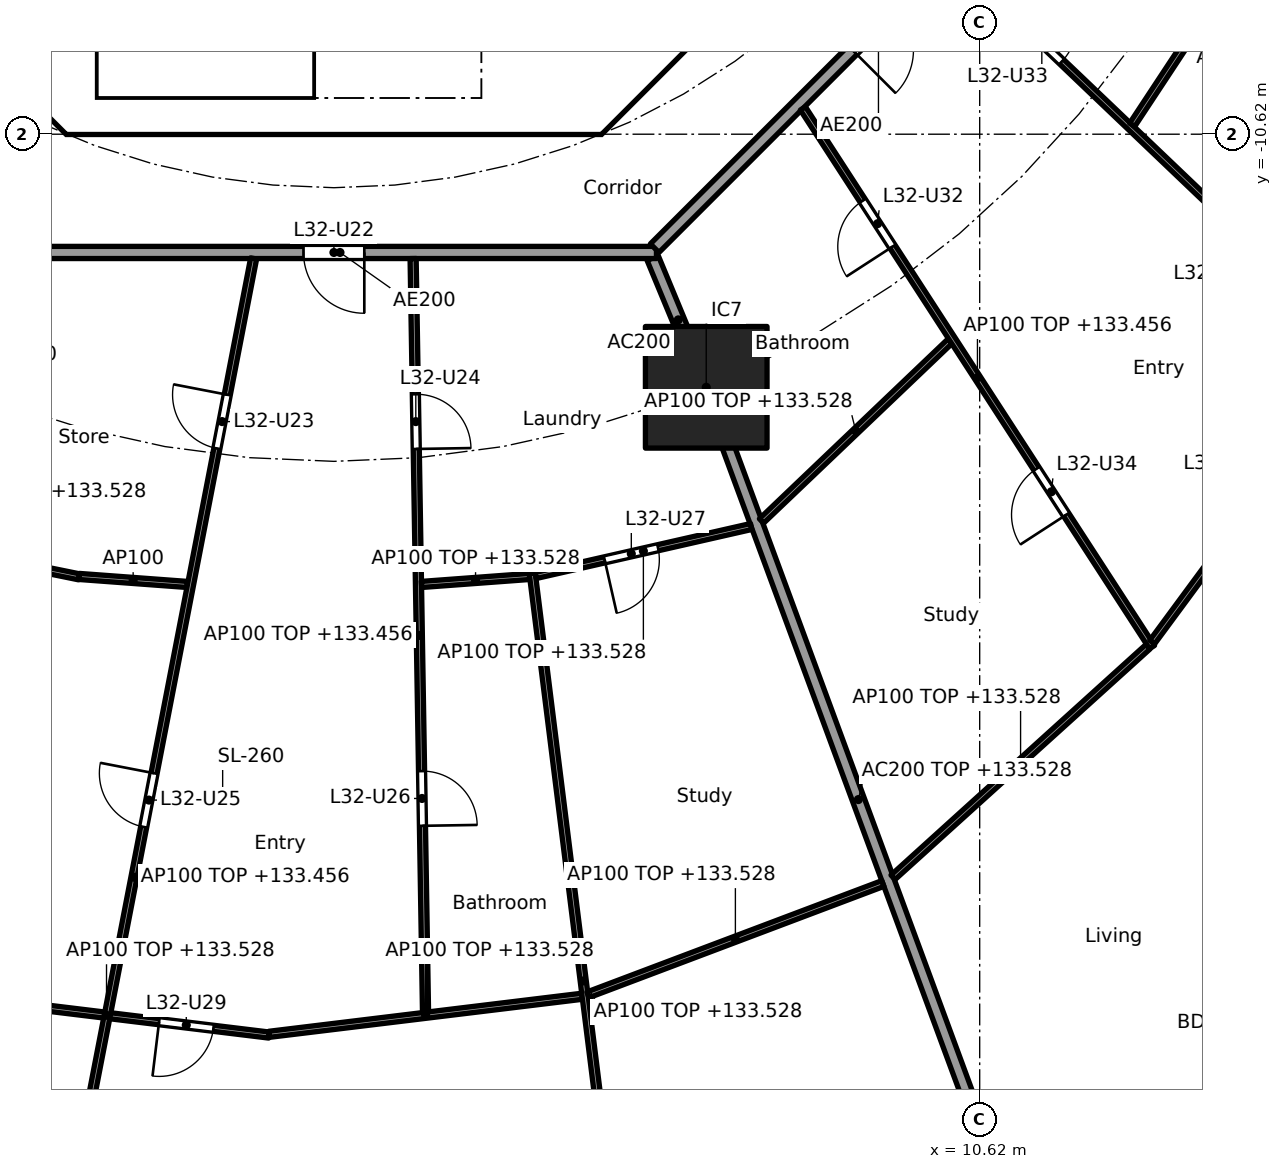
"""IFC4 building model, lengths in metres.
Left out: names, types, materials, properties, quantities, classifications, styles, units other than length and angle.
Written with IfcOpenShell. Run it as: python <this file> out.ifc"""

import sys

from ifc_helpers import new_model, si_unit, direction, frame, frame_2d, origin, origin_2d, place, context, subcontext, project, spatial, polyline, rectangle, outline, extrude, element, fill, save


model = new_model("IFC4")
c1 = context("Model", 3, precision=1e-05, world=origin(), true_north=direction((0.0, 1.0)))
c2 = subcontext(c1, "Body", "Model", "MODEL_VIEW")
j1 = project(units=[si_unit("LENGTHUNIT", "METRE"), si_unit("PLANEANGLEUNIT", "RADIAN")], contexts=[c1])
p1 = place(None, origin())
s1 = spatial("IfcSite", under=j1, at=p1, CompositionType="ELEMENT")
p2 = place(p1, origin())
s2 = spatial("IfcBuilding", under=s1, at=p2, CompositionType="ELEMENT")
p3 = place(p2, frame((0.0, 0.0, 130.7)))
s3 = spatial("IfcBuildingStorey", under=s2, at=p3, CompositionType="ELEMENT", Elevation=130.7)
p4 = place(p3, frame((6.123, -14.782, 0.0), z_axis=(0.0, 0.0, 1.0), x_axis=(1.0, 0.0, 0.0)))
e1 = element("IfcColumn", 1, at=p4, inside=s3, PredefinedType="COLUMN", context=c2, shape_type="SweptSolid", body=[
    extrude(rectangle(XDim=2.0, YDim=2.0, at=origin_2d()), origin(), (0.0, 0.0, 1.0), 3.7),
])
p5 = place(p3, frame((16.45, -24.804, 0.0), z_axis=(0.0, 0.0, 1.0), x_axis=(-0.707857739375, -0.706355024621, 0.0)))
e2 = element("IfcWall", 2, at=p5, inside=s3, PredefinedType="SOLIDWALL", context=c2, shape_type="SweptSolid", body=[
    extrude(rectangle(XDim=3.087, YDim=0.25, at=frame_2d((1.543, 0.0))), origin(), (0.0, 0.0, 1.0), 3.44),
])
p6 = place(p5, frame((0.493, 0.0, 0.0)))
e3 = element("IfcOpeningElement", 3, at=p6, cuts=e2, PredefinedType="OPENING", context=c2, shape_type="SweptSolid", body=[
    extrude(rectangle(XDim=2.1, YDim=2.4, at=frame_2d((1.05, 1.2))), frame((0.0, 0.135, 0.0), z_axis=(0.0, -1.0, 0.0), x_axis=(1.0, 0.0, 0.0)), (0.0, 0.0, 1.0), 0.27),
])
p7 = place(p3, frame((-9.988, -4.613, 0.0), z_axis=(0.0, 0.0, 1.0), x_axis=(0.707106781187, -0.707106781187, 0.0)))
e4 = element("IfcWall", 4, at=p7, inside=s3, PredefinedType="SHEAR", context=c2, shape_type="SweptSolid", body=[
    extrude(rectangle(XDim=7.602, YDim=0.6, at=frame_2d((3.801, 0.0))), origin(), (0.0, 0.0, 1.0), 3.44),
])
p8 = place(p7, frame((6.151, 0.0, 0.0)))
e5 = element("IfcOpeningElement", 5, at=p8, cuts=e4, PredefinedType="OPENING", context=c2, shape_type="SweptSolid", body=[
    extrude(rectangle(XDim=1.1, YDim=2.1, at=frame_2d((0.55, 1.05))), frame((0.0, 0.31, 0.0), z_axis=(0.0, -1.0, 0.0), x_axis=(1.0, 0.0, 0.0)), (0.0, 0.0, 1.0), 0.62),
])
p9 = place(p3, frame((4.613, -9.988, 0.0), z_axis=(0.0, 0.0, 1.0), x_axis=(0.707106781187, 0.707106781187, 0.0)))
e6 = element("IfcWall", 6, at=p9, inside=s3, PredefinedType="SHEAR", context=c2, shape_type="SweptSolid", body=[
    extrude(rectangle(XDim=7.602, YDim=0.6, at=frame_2d((3.801, 0.0))), origin(), (0.0, 0.0, 1.0), 3.44),
])
p10 = place(p9, frame((3.201, 0.0, 0.0)))
e7 = element("IfcOpeningElement", 7, at=p10, cuts=e6, PredefinedType="OPENING", context=c2, shape_type="SweptSolid", body=[
    extrude(rectangle(XDim=1.2, YDim=2.1, at=frame_2d((0.6, 1.05))), frame((0.0, 0.31, 0.0), z_axis=(0.0, -1.0, 0.0), x_axis=(1.0, 0.0, 0.0)), (0.0, 0.0, 1.0), 0.62),
])
p11 = place(p3, frame((4.0, -10.025, 0.0), z_axis=(0.0, 0.0, 1.0), x_axis=(0.0, 1.0, 0.0)))
e8 = element("IfcWall", 8, at=p11, inside=s3, PredefinedType="SOLIDWALL", context=c2, shape_type="SweptSolid", body=[
    extrude(rectangle(XDim=3.0, YDim=0.2, at=frame_2d((1.5, 0.0))), origin(), (0.0, 0.0, 1.0), 3.44),
])
p12 = place(p11, frame((0.975, 0.0, 0.0)))
e9 = element("IfcOpeningElement", 9, at=p12, cuts=e8, PredefinedType="OPENING", context=c2, shape_type="SweptSolid", body=[
    extrude(rectangle(XDim=1.1, YDim=2.1, at=frame_2d((0.55, 1.05))), frame((0.0, 0.11, 0.0), z_axis=(0.0, -1.0, 0.0), x_axis=(1.0, 0.0, 0.0)), (0.0, 0.0, 1.0), 0.22),
])
p13 = place(p3, origin())
e10 = element("IfcWall", 10, at=p13, inside=s3, PredefinedType="SHEAR", context=c2, shape_type="SweptSolid", body=[
    extrude(outline(polyline([(-4.152, -10.025), (4.152, -10.025), (4.401, -9.776), (4.825, -10.2), (4.401, -10.625), (-4.401, -10.625), (-4.825, -10.2), (-4.401, -9.776), (-4.152, -10.025)])), origin(), (0.0, 0.0, 1.0), 3.44),
])
p14 = place(p3, origin())
e11 = element("IfcWall", 11, at=p14, inside=s3, PredefinedType="SOLIDWALL", context=c2, shape_type="SweptSolid", body=[
    extrude(outline(polyline([(-3.9, -10.025), (-4.1, -10.025), (-4.1, -7.025), (-3.9, -7.025), (-3.9, -10.025)])), origin(), (0.0, 0.0, 1.0), 3.44),
])
p15 = place(p3, frame((5.243, -12.657, 0.0), z_axis=(0.0, 0.0, 1.0), x_axis=(0.38273085373, -0.923859888513, 0.0)))
e12 = element("IfcWall", 12, at=p15, inside=s3, PredefinedType="PARTITIONING", context=c2, shape_type="SweptSolid", body=[
    extrude(rectangle(XDim=2.199, YDim=0.2, at=frame_2d((1.1, 0.0))), origin(), (0.0, 0.0, 1.0), 3.44),
])
p16 = place(p3, frame((6.14, -14.829, 0.0), z_axis=(0.0, 0.0, 1.0), x_axis=(0.346169582481, -0.938171956608, 0.0)))
e13 = element("IfcWall", 13, at=p16, inside=s3, PredefinedType="PARTITIONING", context=c2, shape_type="SweptSolid", body=[
    extrude(rectangle(XDim=14.354, YDim=0.2, at=frame_2d((7.177, 0.0))), origin(), (0.0, 0.0, 1.0), 2.828),
])
p17 = place(p3, frame((-5.104, -12.565, 0.0), z_axis=(0.0, 0.0, 1.0), x_axis=(1.0, 0.0, 0.0)))
e14 = element("IfcWall", 14, at=p17, inside=s3, PredefinedType="PARTITIONING", context=c2, shape_type="SweptSolid", body=[
    extrude(rectangle(XDim=10.409, YDim=0.2, at=frame_2d((5.205, 0.0))), origin(), (0.0, 0.0, 1.0), 3.44),
])
p18 = place(p17, frame((4.604, 0.0, 0.0)))
e15 = element("IfcOpeningElement", 15, at=p18, cuts=e14, PredefinedType="OPENING", context=c2, shape_type="SweptSolid", body=[
    extrude(rectangle(XDim=1.0, YDim=2.1, at=frame_2d((0.5, 1.05))), frame((0.0, 0.11, 0.0), z_axis=(0.0, -1.0, 0.0), x_axis=(1.0, 0.0, 0.0)), (0.0, 0.0, 1.0), 0.22),
])
p19 = place(p3, frame((5.275, -12.494, 0.0), z_axis=(0.0, 0.0, 1.0), x_axis=(0.707106781187, 0.707106781187, 0.0)))
e16 = element("IfcWall", 16, at=p19, inside=s3, PredefinedType="PARTITIONING", context=c2, shape_type="SweptSolid", body=[
    extrude(rectangle(XDim=10.409, YDim=0.2, at=frame_2d((5.205, 0.0))), origin(), (0.0, 0.0, 1.0), 3.44),
])
p20 = place(p19, frame((4.604, 0.0, 0.0)))
e17 = element("IfcOpeningElement", 17, at=p20, cuts=e16, PredefinedType="OPENING", context=c2, shape_type="SweptSolid", body=[
    extrude(rectangle(XDim=1.0, YDim=2.1, at=frame_2d((0.5, 1.05))), frame((0.0, 0.11, 0.0), z_axis=(0.0, -1.0, 0.0), x_axis=(1.0, 0.0, 0.0)), (0.0, 0.0, 1.0), 0.22),
])
p21 = place(p3, frame((-7.52, -17.222, 0.0), z_axis=(0.0, 0.0, 1.0), x_axis=(0.979964966792, -0.199169937141, 0.0)))
e18 = element("IfcWall", 18, at=p21, inside=s3, PredefinedType="PARTITIONING", context=c2, shape_type="SweptSolid", body=[
    extrude(rectangle(XDim=3.397, YDim=0.1, at=frame_2d((1.698, 0.0))), origin(), (0.0, 0.0, 1.0), 2.828),
])
p22 = place(p3, frame((-4.19, -17.893, 0.0), z_axis=(0.0, 0.0, 1.0), x_axis=(0.99727037024, -0.07383636395, 0.0)))
e19 = element("IfcWall", 19, at=p22, inside=s3, PredefinedType="PARTITIONING", context=c2, shape_type="SweptSolid", body=[
    extrude(rectangle(XDim=1.782, YDim=0.1, at=frame_2d((0.891, 0.0))), origin(), (0.0, 0.0, 1.0), 3.44),
])
p23 = place(p3, frame((-6.413, -24.784, 0.0), z_axis=(0.0, 0.0, 1.0), x_axis=(0.99268660964, -0.120719903255, 0.0)))
e20 = element("IfcWall", 20, at=p23, inside=s3, PredefinedType="PARTITIONING", context=c2, shape_type="SweptSolid", body=[
    extrude(rectangle(XDim=5.385, YDim=0.1, at=frame_2d((2.693, 0.0))), origin(), (0.0, 0.0, 1.0), 2.828),
])
p24 = place(p23, frame((3.564, 0.0, 0.0)))
e21 = element("IfcOpeningElement", 21, at=p24, cuts=e20, PredefinedType="OPENING", context=c2, shape_type="SweptSolid", body=[
    extrude(rectangle(XDim=0.9, YDim=2.1, at=frame_2d((0.45, 1.05))), frame((0.0, 0.06, 0.0), z_axis=(0.0, -1.0, 0.0), x_axis=(1.0, 0.0, 0.0)), (0.0, 0.0, 1.0), 0.12),
])
p25 = place(p3, frame((-1.32, -12.663, 0.0), z_axis=(0.0, 0.0, 1.0), x_axis=(-0.189865535907, -0.98181010296, 0.0)))
e22 = element("IfcWall", 22, at=p25, inside=s3, PredefinedType="PARTITIONING", context=c2, shape_type="SweptSolid", body=[
    extrude(rectangle(XDim=20.729, YDim=0.1, at=frame_2d((10.365, 0.0))), origin(), (0.0, 0.0, 1.0), 2.756),
])
p26 = place(p25, frame((2.283, 0.0, 0.0)))
e23 = element("IfcOpeningElement", 23, at=p26, cuts=e22, PredefinedType="OPENING", context=c2, shape_type="SweptSolid", body=[
    extrude(rectangle(XDim=0.9, YDim=2.1, at=frame_2d((0.45, 1.05))), frame((0.0, 0.06, 0.0), z_axis=(0.0, -1.0, 0.0), x_axis=(1.0, 0.0, 0.0)), (0.0, 0.0, 1.0), 0.12),
])
p27 = place(p25, frame((8.622, 0.0, 0.0)))
e24 = element("IfcOpeningElement", 24, at=p27, cuts=e22, PredefinedType="OPENING", context=c2, shape_type="SweptSolid", body=[
    extrude(rectangle(XDim=0.9, YDim=2.1, at=frame_2d((0.45, 1.05))), frame((0.0, 0.06, 0.0), z_axis=(0.0, -1.0, 0.0), x_axis=(1.0, 0.0, 0.0)), (0.0, 0.0, 1.0), 0.12),
])
p28 = place(p3, frame((-1.066, -25.422, 0.0), z_axis=(0.0, 0.0, 1.0), x_axis=(0.992692993044, 0.120667400577, 0.0)))
e25 = element("IfcWall", 25, at=p28, inside=s3, PredefinedType="PARTITIONING", context=c2, shape_type="SweptSolid", body=[
    extrude(rectangle(XDim=5.186, YDim=0.1, at=frame_2d((2.593, 0.0))), origin(), (0.0, 0.0, 1.0), 2.828),
])
p29 = place(p3, frame((1.303, -12.665, 0.0), z_axis=(0.0, 0.0, 1.0), x_axis=(0.016444820401, -0.999864774798, 0.0)))
e26 = element("IfcWall", 26, at=p29, inside=s3, PredefinedType="PARTITIONING", context=c2, shape_type="SweptSolid", body=[
    extrude(rectangle(XDim=12.396, YDim=0.1, at=frame_2d((6.198, 0.0))), origin(), (0.0, 0.0, 1.0), 2.756),
])
p30 = place(p29, frame((2.232, 0.0, 0.0)))
e27 = element("IfcOpeningElement", 27, at=p30, cuts=e26, PredefinedType="OPENING", context=c2, shape_type="SweptSolid", body=[
    extrude(rectangle(XDim=0.9, YDim=2.1, at=frame_2d((0.45, 1.05))), frame((0.0, 0.06, 0.0), z_axis=(0.0, -1.0, 0.0), x_axis=(1.0, 0.0, 0.0)), (0.0, 0.0, 1.0), 0.12),
])
p31 = place(p29, frame((8.43, 0.0, 0.0)))
e28 = element("IfcOpeningElement", 28, at=p31, cuts=e26, PredefinedType="OPENING", context=c2, shape_type="SweptSolid", body=[
    extrude(rectangle(XDim=0.9, YDim=2.1, at=frame_2d((0.45, 1.05))), frame((0.0, 0.06, 0.0), z_axis=(0.0, -1.0, 0.0), x_axis=(1.0, 0.0, 0.0)), (0.0, 0.0, 1.0), 0.12),
])
p32 = place(p3, frame((1.441, -18.024, 0.0), z_axis=(0.0, 0.0, 1.0), x_axis=(0.997269623256, 0.073846452388, 0.0)))
e29 = element("IfcWall", 29, at=p32, inside=s3, PredefinedType="PARTITIONING", context=c2, shape_type="SweptSolid", body=[
    extrude(rectangle(XDim=1.782, YDim=0.1, at=frame_2d((0.891, 0.0))), origin(), (0.0, 0.0, 1.0), 2.828),
])
p33 = place(p3, frame((3.262, -17.839, 0.0), z_axis=(0.0, 0.0, 1.0), x_axis=(0.124074750982, -0.992272873845, 0.0)))
e30 = element("IfcWall", 30, at=p33, inside=s3, PredefinedType="PARTITIONING", context=c2, shape_type="SweptSolid", body=[
    extrude(rectangle(XDim=13.516, YDim=0.1, at=frame_2d((6.758, 0.0))), origin(), (0.0, 0.0, 1.0), 2.828),
])
p34 = place(p33, frame((9.811, 0.0, 0.0)))
e31 = element("IfcOpeningElement", 31, at=p34, cuts=e30, PredefinedType="OPENING", context=c2, shape_type="SweptSolid", body=[
    extrude(rectangle(XDim=0.9, YDim=2.1, at=frame_2d((0.45, 1.05))), frame((0.0, 0.06, 0.0), z_axis=(0.0, -1.0, 0.0), x_axis=(1.0, 0.0, 0.0)), (0.0, 0.0, 1.0), 0.12),
])
p35 = place(p3, frame((3.317, -17.878, 0.0), z_axis=(0.0, 0.0, 1.0), x_axis=(0.975095905288, 0.221783623135, 0.0)))
e32 = element("IfcWall", 32, at=p35, inside=s3, PredefinedType="PARTITIONING", context=c2, shape_type="SweptSolid", body=[
    extrude(rectangle(XDim=3.636, YDim=0.1, at=frame_2d((1.818, 0.0))), origin(), (0.0, 0.0, 1.0), 2.828),
])
p36 = place(p35, frame((1.164, 0.0, 0.0)))
e33 = element("IfcOpeningElement", 33, at=p36, cuts=e32, PredefinedType="OPENING", context=c2, shape_type="SweptSolid", body=[
    extrude(rectangle(XDim=0.9, YDim=2.1, at=frame_2d((0.45, 1.05))), frame((0.0, 0.06, 0.0), z_axis=(0.0, -1.0, 0.0), x_axis=(1.0, 0.0, 0.0)), (0.0, 0.0, 1.0), 0.12),
])
p37 = place(p3, frame((4.178, -24.773, 0.0), z_axis=(0.0, 0.0, 1.0), x_axis=(0.935583811437, 0.353104703702, 0.0)))
e34 = element("IfcWall", 34, at=p37, inside=s3, PredefinedType="PARTITIONING", context=c2, shape_type="SweptSolid", body=[
    extrude(rectangle(XDim=5.184, YDim=0.1, at=frame_2d((2.592, 0.0))), origin(), (0.0, 0.0, 1.0), 2.828),
])
p38 = place(p3, frame((7.032, -16.98, 0.0), z_axis=(0.0, 0.0, 1.0), x_axis=(0.723709759148, 0.690104473622, 0.0)))
e35 = element("IfcWall", 35, at=p38, inside=s3, PredefinedType="PARTITIONING", context=c2, shape_type="SweptSolid", body=[
    extrude(rectangle(XDim=4.286, YDim=0.1, at=frame_2d((2.143, 0.0))), origin(), (0.0, 0.0, 1.0), 2.828),
])
p39 = place(p3, frame((9.195, -22.84, 0.0), z_axis=(0.0, 0.0, 1.0), x_axis=(0.741675855479, 0.670758470241, 0.0)))
e36 = element("IfcWall", 36, at=p39, inside=s3, PredefinedType="PARTITIONING", context=c2, shape_type="SweptSolid", body=[
    extrude(rectangle(XDim=5.656, YDim=0.1, at=frame_2d((2.828, 0.0))), origin(), (0.0, 0.0, 1.0), 2.828),
])
p40 = place(p3, frame((7.712, -10.195, 0.0), z_axis=(0.0, 0.0, 1.0), x_axis=(0.543868615753, -0.839170381269, 0.0)))
e37 = element("IfcWall", 37, at=p40, inside=s3, PredefinedType="PARTITIONING", context=c2, shape_type="SweptSolid", body=[
    extrude(rectangle(XDim=10.558, YDim=0.1, at=frame_2d((5.279, 0.0))), origin(), (0.0, 0.0, 1.0), 2.756),
])
p41 = place(p40, frame((1.81, 0.0, 0.0)))
e38 = element("IfcOpeningElement", 38, at=p41, cuts=e37, PredefinedType="OPENING", context=c2, shape_type="SweptSolid", body=[
    extrude(rectangle(XDim=0.9, YDim=2.1, at=frame_2d((0.45, 1.05))), frame((0.0, 0.06, 0.0), z_axis=(0.0, -1.0, 0.0), x_axis=(1.0, 0.0, 0.0)), (0.0, 0.0, 1.0), 0.12),
])
p42 = place(p40, frame((7.064, 0.0, 0.0)))
e39 = element("IfcOpeningElement", 39, at=p42, cuts=e37, PredefinedType="OPENING", context=c2, shape_type="SweptSolid", body=[
    extrude(rectangle(XDim=0.9, YDim=2.1, at=frame_2d((0.45, 1.05))), frame((0.0, 0.06, 0.0), z_axis=(0.0, -1.0, 0.0), x_axis=(1.0, 0.0, 0.0)), (0.0, 0.0, 1.0), 0.12),
])
p43 = place(p3, frame((13.457, -18.973, 0.0), z_axis=(0.0, 0.0, 1.0), x_axis=(0.593532053206, 0.80481035146, 0.0)))
e40 = element("IfcWall", 40, at=p43, inside=s3, PredefinedType="PARTITIONING", context=c2, shape_type="SweptSolid", body=[
    extrude(rectangle(XDim=5.876, YDim=0.1, at=frame_2d((2.938, 0.0))), origin(), (0.0, 0.0, 1.0), 2.828),
])
p44 = place(p43, frame((2.488, 0.0, 0.0)))
e41 = element("IfcOpeningElement", 41, at=p44, cuts=e40, PredefinedType="OPENING", context=c2, shape_type="SweptSolid", body=[
    extrude(rectangle(XDim=0.9, YDim=2.1, at=frame_2d((0.45, 1.05))), frame((0.0, 0.06, 0.0), z_axis=(0.0, -1.0, 0.0), x_axis=(1.0, 0.0, 0.0)), (0.0, 0.0, 1.0), 0.12),
])
p45 = place(p3, frame((10.184, -7.727, 0.0), z_axis=(0.0, 0.0, 1.0), x_axis=(0.723635100101, -0.690182759783, 0.0)))
e42 = element("IfcWall", 42, at=p45, inside=s3, PredefinedType="PARTITIONING", context=c2, shape_type="SweptSolid", body=[
    extrude(rectangle(XDim=14.173, YDim=0.1, at=frame_2d((7.086, 0.0))), origin(), (0.0, 0.0, 1.0), 2.756),
])
p46 = place(p45, frame((1.565, 0.0, 0.0)))
e43 = element("IfcOpeningElement", 43, at=p46, cuts=e42, PredefinedType="OPENING", context=c2, shape_type="SweptSolid", body=[
    extrude(rectangle(XDim=0.9, YDim=2.1, at=frame_2d((0.45, 1.05))), frame((0.0, 0.06, 0.0), z_axis=(0.0, -1.0, 0.0), x_axis=(1.0, 0.0, 0.0)), (0.0, 0.0, 1.0), 0.12),
])
p47 = place(p45, frame((6.257, 0.0, 0.0)))
e44 = element("IfcOpeningElement", 44, at=p47, cuts=e42, PredefinedType="OPENING", context=c2, shape_type="SweptSolid", body=[
    extrude(rectangle(XDim=0.9, YDim=2.1, at=frame_2d((0.45, 1.05))), frame((0.0, 0.06, 0.0), z_axis=(0.0, -1.0, 0.0), x_axis=(1.0, 0.0, 0.0)), (0.0, 0.0, 1.0), 0.12),
])
p48 = place(p45, frame((11.328, 0.0, 0.0)))
e45 = element("IfcOpeningElement", 45, at=p48, cuts=e42, PredefinedType="OPENING", context=c2, shape_type="SweptSolid", body=[
    extrude(rectangle(XDim=0.9, YDim=2.1, at=frame_2d((0.45, 1.05))), frame((0.0, 0.06, 0.0), z_axis=(0.0, -1.0, 0.0), x_axis=(1.0, 0.0, 0.0)), (0.0, 0.0, 1.0), 0.12),
])
p49 = place(p3, frame((13.127, -10.467, 0.0), z_axis=(0.0, 0.0, 1.0), x_axis=(0.550614843759, 0.834759422727, 0.0)))
e46 = element("IfcWall", 46, at=p49, inside=s3, PredefinedType="PARTITIONING", context=c2, shape_type="SweptSolid", body=[
    extrude(rectangle(XDim=4.683, YDim=0.1, at=frame_2d((2.341, 0.0))), origin(), (0.0, 0.0, 1.0), 2.828),
])
p50 = place(p18, frame((1.0, 0.0, 0.0), x_axis=(-1.0, 0.0, 0.0)))
e47 = element("IfcDoor", 47, at=p50, inside=s3, OperationType="SINGLE_SWING_LEFT", PredefinedType="DOOR", context=c2, shape_type="SweptSolid", body=[
    extrude(rectangle(XDim=1.0, YDim=2.1, at=frame_2d((0.5, 1.05))), frame((0.0, 0.025, 0.0), z_axis=(0.0, -1.0, 0.0), x_axis=(1.0, 0.0, 0.0)), (0.0, 0.0, 1.0), 0.05),
])
fill(e15, e47)
p51 = place(p26, frame((0.9, 0.0, 0.0), x_axis=(-1.0, 0.0, 0.0)))
e48 = element("IfcDoor", 48, at=p51, inside=s3, OperationType="SINGLE_SWING_RIGHT", PredefinedType="DOOR", context=c2, shape_type="SweptSolid", body=[
    extrude(rectangle(XDim=0.9, YDim=2.1, at=frame_2d((0.45, 1.05))), frame((0.0, 0.025, 0.0), z_axis=(0.0, -1.0, 0.0), x_axis=(1.0, 0.0, 0.0)), (0.0, 0.0, 1.0), 0.05),
])
fill(e23, e48)
p52 = place(p30, origin())
e49 = element("IfcDoor", 49, at=p52, inside=s3, OperationType="SINGLE_SWING_RIGHT", PredefinedType="DOOR", context=c2, shape_type="SweptSolid", body=[
    extrude(rectangle(XDim=0.9, YDim=2.1, at=frame_2d((0.45, 1.05))), frame((0.0, 0.025, 0.0), z_axis=(0.0, -1.0, 0.0), x_axis=(1.0, 0.0, 0.0)), (0.0, 0.0, 1.0), 0.05),
])
fill(e27, e49)
p53 = place(p27, frame((0.9, 0.0, 0.0), x_axis=(-1.0, 0.0, 0.0)))
e50 = element("IfcDoor", 50, at=p53, inside=s3, OperationType="SINGLE_SWING_RIGHT", PredefinedType="DOOR", context=c2, shape_type="SweptSolid", body=[
    extrude(rectangle(XDim=0.9, YDim=2.1, at=frame_2d((0.45, 1.05))), frame((0.0, 0.025, 0.0), z_axis=(0.0, -1.0, 0.0), x_axis=(1.0, 0.0, 0.0)), (0.0, 0.0, 1.0), 0.05),
])
fill(e24, e50)
p54 = place(p31, origin())
e51 = element("IfcDoor", 51, at=p54, inside=s3, OperationType="SINGLE_SWING_RIGHT", PredefinedType="DOOR", context=c2, shape_type="SweptSolid", body=[
    extrude(rectangle(XDim=0.9, YDim=2.1, at=frame_2d((0.45, 1.05))), frame((0.0, 0.025, 0.0), z_axis=(0.0, -1.0, 0.0), x_axis=(1.0, 0.0, 0.0)), (0.0, 0.0, 1.0), 0.05),
])
fill(e28, e51)
p55 = place(p36, frame((0.9, 0.0, 0.0), x_axis=(-1.0, 0.0, 0.0)))
e52 = element("IfcDoor", 52, at=p55, inside=s3, OperationType="SINGLE_SWING_RIGHT", PredefinedType="DOOR", context=c2, shape_type="SweptSolid", body=[
    extrude(rectangle(XDim=0.9, YDim=2.1, at=frame_2d((0.45, 1.05))), frame((0.0, 0.025, 0.0), z_axis=(0.0, -1.0, 0.0), x_axis=(1.0, 0.0, 0.0)), (0.0, 0.0, 1.0), 0.05),
])
fill(e33, e52)
p56 = place(p24, frame((0.9, 0.0, 0.0), x_axis=(-1.0, 0.0, 0.0)))
e53 = element("IfcDoor", 53, at=p56, inside=s3, OperationType="SINGLE_SWING_RIGHT", PredefinedType="DOOR", context=c2, shape_type="SweptSolid", body=[
    extrude(rectangle(XDim=0.9, YDim=2.1, at=frame_2d((0.45, 1.05))), frame((0.0, 0.025, 0.0), z_axis=(0.0, -1.0, 0.0), x_axis=(1.0, 0.0, 0.0)), (0.0, 0.0, 1.0), 0.05),
])
fill(e21, e53)
p57 = place(p41, frame((0.9, 0.0, 0.0), x_axis=(-1.0, 0.0, 0.0)))
e54 = element("IfcDoor", 54, at=p57, inside=s3, OperationType="SINGLE_SWING_LEFT", PredefinedType="DOOR", context=c2, shape_type="SweptSolid", body=[
    extrude(rectangle(XDim=0.9, YDim=2.1, at=frame_2d((0.45, 1.05))), frame((0.0, 0.025, 0.0), z_axis=(0.0, -1.0, 0.0), x_axis=(1.0, 0.0, 0.0)), (0.0, 0.0, 1.0), 0.05),
])
fill(e38, e54)
p58 = place(p46, origin())
e55 = element("IfcDoor", 55, at=p58, inside=s3, OperationType="SINGLE_SWING_LEFT", PredefinedType="DOOR", context=c2, shape_type="SweptSolid", body=[
    extrude(rectangle(XDim=0.9, YDim=2.1, at=frame_2d((0.45, 1.05))), frame((0.0, 0.025, 0.0), z_axis=(0.0, -1.0, 0.0), x_axis=(1.0, 0.0, 0.0)), (0.0, 0.0, 1.0), 0.05),
])
fill(e43, e55)
p59 = place(p42, frame((0.9, 0.0, 0.0), x_axis=(-1.0, 0.0, 0.0)))
e56 = element("IfcDoor", 56, at=p59, inside=s3, OperationType="SINGLE_SWING_LEFT", PredefinedType="DOOR", context=c2, shape_type="SweptSolid", body=[
    extrude(rectangle(XDim=0.9, YDim=2.1, at=frame_2d((0.45, 1.05))), frame((0.0, 0.025, 0.0), z_axis=(0.0, -1.0, 0.0), x_axis=(1.0, 0.0, 0.0)), (0.0, 0.0, 1.0), 0.05),
])
fill(e39, e56)
save(model, sys.argv[1])
